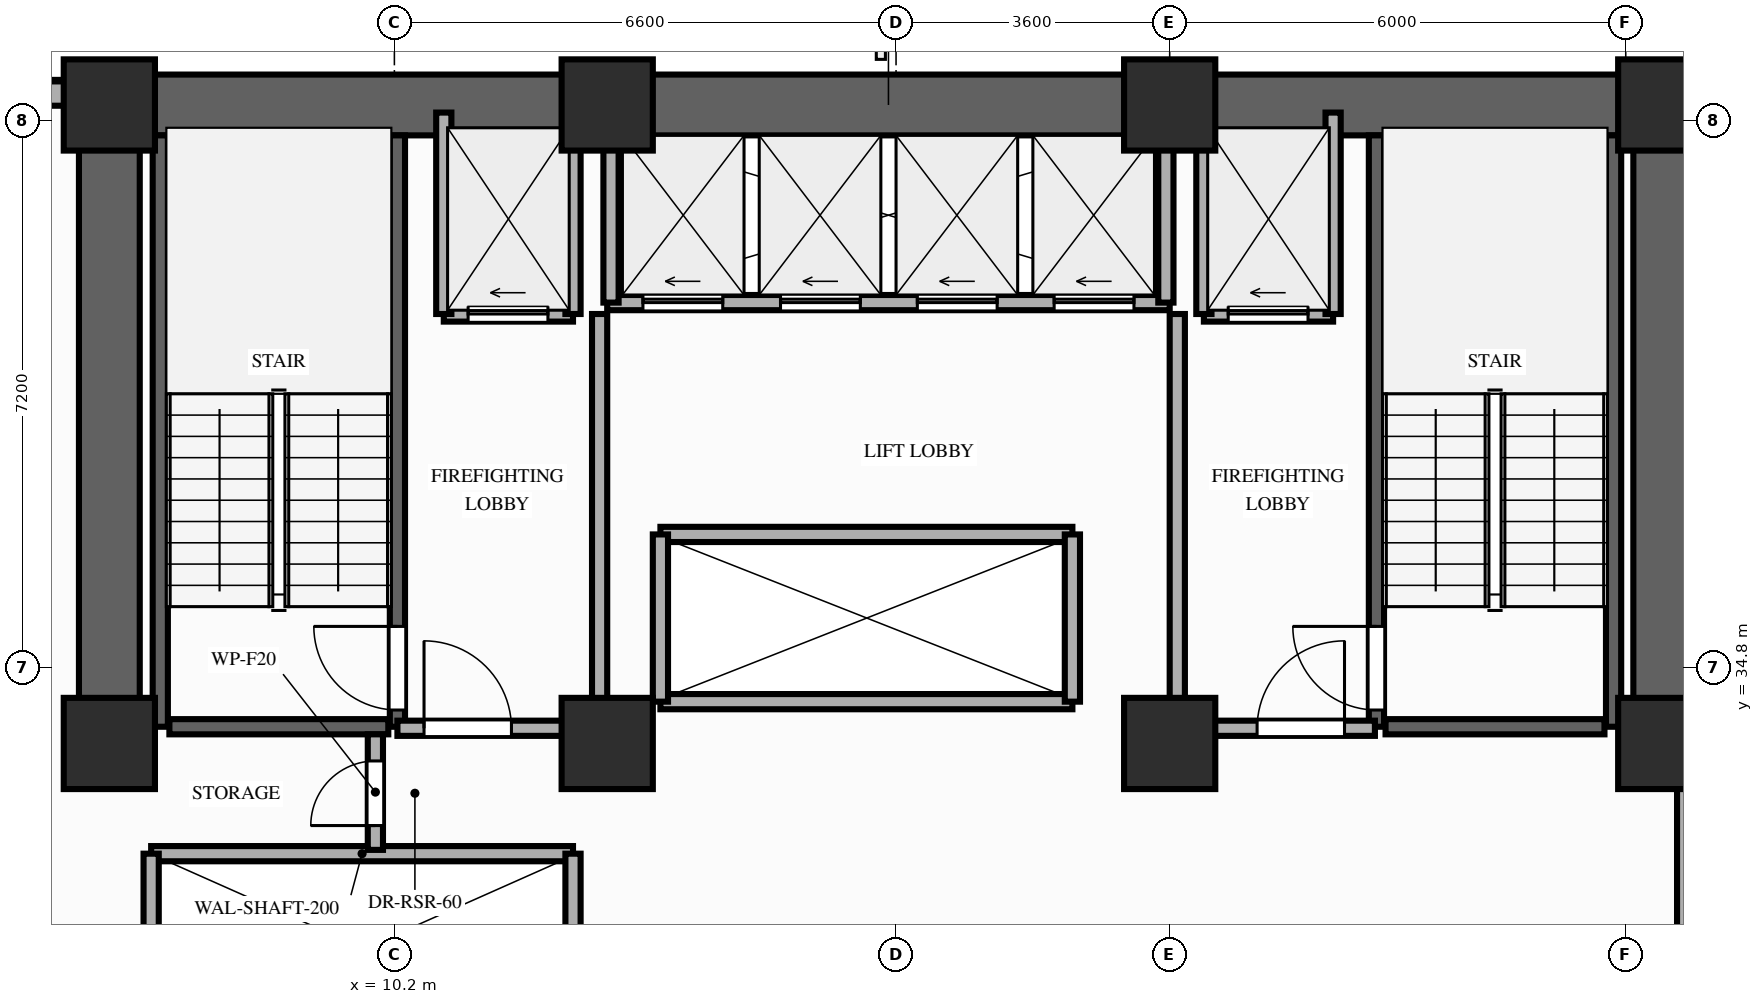
"""IFC4 building model, lengths in metres.
Left out: names, types, materials, properties, quantities, classifications, styles, units other than length and angle.
Written with IfcOpenShell. Run it as: python <this file> out.ifc"""

import sys

from ifc_helpers import new_model, si_unit, direction, frame, frame_2d, origin, origin_2d, place, context, subcontext, project, spatial, rectangle, extrude, element, fill, save


model = new_model("IFC4")
c1 = context("Model", 3, precision=1e-05, world=origin(), true_north=direction((0.0, 1.0)))
c2 = subcontext(c1, "Body", "Model", "MODEL_VIEW")
j1 = project(units=[si_unit("LENGTHUNIT", "METRE"), si_unit("PLANEANGLEUNIT", "RADIAN")], contexts=[c1])
p1 = place(None, origin())
s1 = spatial("IfcSite", under=j1, at=p1, CompositionType="ELEMENT")
p2 = place(p1, origin())
s2 = spatial("IfcBuilding", under=s1, at=p2, CompositionType="ELEMENT")
p3 = place(p2, frame((0.0, 0.0, 26.4)))
s3 = spatial("IfcBuildingStorey", under=s2, at=p3, CompositionType="ELEMENT", Elevation=26.4)
for number, where, z_axis, x_axis in (
    (1, (6.45, 33.8, 0.0), (0.0, 0.0, 1.0), (1.0, 0.0, 0.0)),
    (2, (13.0, 33.8, 0.0), (0.0, 0.0, 1.0), (1.0, 0.0, 0.0)),
    (3, (20.4, 33.8, 0.0), (0.0, 0.0, 1.0), (1.0, 0.0, 0.0)),
    (4, (26.9, 33.8, 0.0), (0.0, 0.0, 1.0), (1.0, 0.0, 0.0)),
    (5, (6.45, 42.2, 0.0), (0.0, 0.0, 1.0), (1.0, 0.0, 0.0)),
    (6, (13.0, 42.2, 0.0), (0.0, 0.0, 1.0), (1.0, 0.0, 0.0)),
    (7, (20.4, 42.2, 0.0), (0.0, 0.0, 1.0), (1.0, 0.0, 0.0)),
    (8, (26.9, 42.2, 0.0), (0.0, 0.0, 1.0), (1.0, 0.0, 0.0)),
):
    element("IfcColumn", number, at=place(p3, frame(where, z_axis=z_axis, x_axis=x_axis)), inside=s3, PredefinedType="COLUMN", context=c2, shape_type="SweptSolid", body=[
        extrude(rectangle(XDim=1.2, YDim=1.2, at=origin_2d()), origin(), (0.0, 0.0, 1.0), 3.8),
    ])
p4 = place(p3, frame((6.0, 42.35, 0.0), z_axis=(0.0, 0.0, 1.0), x_axis=(-1.0, 0.0, 0.0)))
e9 = element("IfcWall", 9, at=p4, inside=s3, PredefinedType="STANDARD", context=c2, shape_type="SweptSolid", body=[
    extrude(rectangle(XDim=2.0, YDim=0.32, at=frame_2d((1.0, 0.0))), origin(), (0.0, 0.0, 1.0), 3.62),
])
p5 = place(p3, frame((6.45, 42.2, 0.0), z_axis=(0.0, 0.0, 1.0), x_axis=(1.0, 0.0, 0.0)))
e10 = element("IfcWall", 10, at=p5, inside=s3, PredefinedType="SHEAR", context=c2, shape_type="SweptSolid", body=[
    extrude(rectangle(XDim=20.45, YDim=0.8, at=frame_2d((10.225, 0.0))), origin(), (0.0, 0.0, 1.0), 3.62),
])
for number, where, z_axis, x_axis in (
    (11, (6.45, 33.8, 0.0), (0.0, 0.0, 1.0), (0.0, 1.0, 0.0)),
    (12, (26.9, 33.8, 0.0), (0.0, 0.0, 1.0), (0.0, 1.0, 0.0)),
):
    element("IfcWall", number, at=place(p3, frame(where, z_axis=z_axis, x_axis=x_axis)), inside=s3, PredefinedType="SHEAR", context=c2, shape_type="SweptSolid", body=[
        extrude(rectangle(XDim=7.95, YDim=0.8, at=frame_2d((3.975, 0.0))), origin(), (0.0, 0.0, 1.0), 3.62),
    ])
p6 = place(p3, frame((7.12, 34.02, 0.0), z_axis=(0.0, 0.0, 1.0), x_axis=(0.0, 1.0, 0.0)))
e13 = element("IfcWall", 13, at=p6, inside=s3, PredefinedType="SHEAR", context=c2, shape_type="SweptSolid", body=[
    extrude(rectangle(XDim=7.78, YDim=0.2, at=frame_2d((3.89, 0.0))), origin(), (0.0, 0.0, 1.0), 3.62),
])
p7 = place(p3, frame((10.24, 34.02, 0.0), z_axis=(0.0, 0.0, 1.0), x_axis=(0.0, 1.0, 0.0)))
e14 = element("IfcWall", 14, at=p7, inside=s3, PredefinedType="SHEAR", context=c2, shape_type="SweptSolid", body=[
    extrude(rectangle(XDim=7.78, YDim=0.2, at=frame_2d((3.89, 0.0))), origin(), (0.0, 0.0, 1.0), 3.62),
])
p8 = place(p7, frame((0.22, 0.0, 0.0)))
e15 = element("IfcOpeningElement", 15, at=p8, cuts=e14, PredefinedType="OPENING", context=c2, shape_type="SweptSolid", body=[
    extrude(rectangle(XDim=1.1, YDim=2.15, at=frame_2d((0.55, 1.075))), frame((0.0, 0.11, 0.0), z_axis=(0.0, -1.0, 0.0), x_axis=(1.0, 0.0, 0.0)), (0.0, 0.0, 1.0), 0.22),
])
p9 = place(p3, frame((7.24, 34.02, 0.0), z_axis=(0.0, 0.0, 1.0), x_axis=(1.0, 0.0, 0.0)))
e16 = element("IfcWall", 16, at=p9, inside=s3, PredefinedType="SHEAR", context=c2, shape_type="SweptSolid", body=[
    extrude(rectangle(XDim=2.88, YDim=0.2, at=frame_2d((1.44, 0.0))), origin(), (0.0, 0.0, 1.0), 3.62),
])
p10 = place(p3, frame((23.12, 34.02, 0.0), z_axis=(0.0, 0.0, 1.0), x_axis=(0.0, 1.0, 0.0)))
e17 = element("IfcWall", 17, at=p10, inside=s3, PredefinedType="SHEAR", context=c2, shape_type="SweptSolid", body=[
    extrude(rectangle(XDim=7.78, YDim=0.2, at=frame_2d((3.89, 0.0))), origin(), (0.0, 0.0, 1.0), 3.62),
])
p11 = place(p10, frame((0.22, 0.0, 0.0)))
e18 = element("IfcOpeningElement", 18, at=p11, cuts=e17, PredefinedType="OPENING", context=c2, shape_type="SweptSolid", body=[
    extrude(rectangle(XDim=1.1, YDim=2.15, at=frame_2d((0.55, 1.075))), frame((0.0, 0.11, 0.0), z_axis=(0.0, -1.0, 0.0), x_axis=(1.0, 0.0, 0.0)), (0.0, 0.0, 1.0), 0.22),
])
p12 = place(p3, frame((26.24, 34.02, 0.0), z_axis=(0.0, 0.0, 1.0), x_axis=(0.0, 1.0, 0.0)))
e19 = element("IfcWall", 19, at=p12, inside=s3, PredefinedType="SHEAR", context=c2, shape_type="SweptSolid", body=[
    extrude(rectangle(XDim=7.78, YDim=0.2, at=frame_2d((3.89, 0.0))), origin(), (0.0, 0.0, 1.0), 3.62),
])
p13 = place(p3, frame((23.24, 34.02, 0.0), z_axis=(0.0, 0.0, 1.0), x_axis=(1.0, 0.0, 0.0)))
e20 = element("IfcWall", 20, at=p13, inside=s3, PredefinedType="SHEAR", context=c2, shape_type="SweptSolid", body=[
    extrude(rectangle(XDim=2.88, YDim=0.2, at=frame_2d((1.44, 0.0))), origin(), (0.0, 0.0, 1.0), 3.62),
])
p14 = place(p3, frame((7.0, 32.35, 0.0), z_axis=(0.0, 0.0, 1.0), x_axis=(1.0, 0.0, 0.0)))
e21 = element("IfcWall", 21, at=p14, inside=s3, PredefinedType="MOVABLE", context=c2, shape_type="SweptSolid", body=[
    extrude(rectangle(XDim=5.55, YDim=0.2, at=frame_2d((2.775, 0.0))), origin(), (0.0, 0.0, 1.0), 3.62),
])
for number, where, z_axis, x_axis in (
    (22, (7.0, 29.85, 0.0), (0.0, 0.0, 1.0), (0.0, 1.0, 0.0)),
    (23, (12.55, 29.85, 0.0), (0.0, 0.0, 1.0), (0.0, 1.0, 0.0)),
):
    element("IfcWall", number, at=place(p3, frame(where, z_axis=z_axis, x_axis=x_axis)), inside=s3, PredefinedType="MOVABLE", context=c2, shape_type="SweptSolid", body=[
        extrude(rectangle(XDim=2.5, YDim=0.2, at=frame_2d((1.25, 0.0))), origin(), (0.0, 0.0, 1.0), 3.62),
    ])
p15 = place(p3, frame((10.85, 39.45, 0.0), z_axis=(0.0, 0.0, 1.0), x_axis=(1.0, 0.0, 0.0)))
e24 = element("IfcWall", 24, at=p15, inside=s3, PredefinedType="MOVABLE", context=c2, shape_type="SweptSolid", body=[
    extrude(rectangle(XDim=1.7, YDim=0.2, at=frame_2d((0.85, 0.0))), origin(), (0.0, 0.0, 1.0), 3.62),
])
p16 = place(p15, frame((0.32, 0.0, 0.0)))
e25 = element("IfcOpeningElement", 25, at=p16, cuts=e24, PredefinedType="OPENING", context=c2, shape_type="SweptSolid", body=[
    extrude(rectangle(XDim=1.05, YDim=2.15, at=frame_2d((0.525, 1.075))), frame((0.0, 0.11, 0.0), z_axis=(0.0, -1.0, 0.0), x_axis=(1.0, 0.0, 0.0)), (0.0, 0.0, 1.0), 0.22),
])
p17 = place(p3, frame((20.85, 39.45, 0.0), z_axis=(0.0, 0.0, 1.0), x_axis=(1.0, 0.0, 0.0)))
e26 = element("IfcWall", 26, at=p17, inside=s3, PredefinedType="MOVABLE", context=c2, shape_type="SweptSolid", body=[
    extrude(rectangle(XDim=1.7, YDim=0.2, at=frame_2d((0.85, 0.0))), origin(), (0.0, 0.0, 1.0), 3.62),
])
p18 = place(p17, frame((0.32, 0.0, 0.0)))
e27 = element("IfcOpeningElement", 27, at=p18, cuts=e26, PredefinedType="OPENING", context=c2, shape_type="SweptSolid", body=[
    extrude(rectangle(XDim=1.05, YDim=2.15, at=frame_2d((0.525, 1.075))), frame((0.0, 0.11, 0.0), z_axis=(0.0, -1.0, 0.0), x_axis=(1.0, 0.0, 0.0)), (0.0, 0.0, 1.0), 0.22),
])
for number, where, z_axis, x_axis in (
    (28, (10.85, 39.45, 0.0), (0.0, 0.0, 1.0), (0.0, 1.0, 0.0)),
    (29, (12.55, 39.45, 0.0), (0.0, 0.0, 1.0), (0.0, 1.0, 0.0)),
):
    element("IfcWall", number, at=place(p3, frame(where, z_axis=z_axis, x_axis=x_axis)), inside=s3, PredefinedType="MOVABLE", context=c2, shape_type="SweptSolid", body=[
        extrude(rectangle(XDim=2.65, YDim=0.2, at=frame_2d((1.325, 0.0))), origin(), (0.0, 0.0, 1.0), 3.0),
    ])
p19 = place(p3, frame((12.9, 34.0, 0.0), z_axis=(0.0, 0.0, 1.0), x_axis=(0.0, 1.0, 0.0)))
e30 = element("IfcWall", 30, at=p19, inside=s3, PredefinedType="PARTITIONING", context=c2, shape_type="SweptSolid", body=[
    extrude(rectangle(XDim=5.45, YDim=0.2, at=frame_2d((2.725, 0.0))), origin(), (0.0, 0.0, 1.0), 3.0),
])
p20 = place(p3, frame((10.24, 34.0, 0.0), z_axis=(0.0, 0.0, 1.0), x_axis=(1.0, 0.0, 0.0)))
e31 = element("IfcWall", 31, at=p20, inside=s3, PredefinedType="PARTITIONING", context=c2, shape_type="SweptSolid", body=[
    extrude(rectangle(XDim=2.66, YDim=0.2, at=frame_2d((1.33, 0.0))), origin(), (0.0, 0.0, 1.0), 3.0),
])
p21 = place(p20, frame((0.35, 0.0, 0.0)))
e32 = element("IfcOpeningElement", 32, at=p21, cuts=e31, PredefinedType="OPENING", context=c2, shape_type="SweptSolid", body=[
    extrude(rectangle(XDim=1.15, YDim=2.15, at=frame_2d((0.575, 1.075))), frame((0.0, 0.11, 0.0), z_axis=(0.0, -1.0, 0.0), x_axis=(1.0, 0.0, 0.0)), (0.0, 0.0, 1.0), 0.22),
])
for number, where, z_axis, x_axis in (
    (33, (20.85, 39.45, 0.0), (0.0, 0.0, 1.0), (0.0, 1.0, 0.0)),
    (34, (22.55, 39.45, 0.0), (0.0, 0.0, 1.0), (0.0, 1.0, 0.0)),
):
    element("IfcWall", number, at=place(p3, frame(where, z_axis=z_axis, x_axis=x_axis)), inside=s3, PredefinedType="MOVABLE", context=c2, shape_type="SweptSolid", body=[
        extrude(rectangle(XDim=2.65, YDim=0.2, at=frame_2d((1.325, 0.0))), origin(), (0.0, 0.0, 1.0), 3.0),
    ])
p22 = place(p3, frame((20.5, 34.0, 0.0), z_axis=(0.0, 0.0, 1.0), x_axis=(0.0, 1.0, 0.0)))
e35 = element("IfcWall", 35, at=p22, inside=s3, PredefinedType="PARTITIONING", context=c2, shape_type="SweptSolid", body=[
    extrude(rectangle(XDim=5.45, YDim=0.2, at=frame_2d((2.725, 0.0))), origin(), (0.0, 0.0, 1.0), 3.0),
])
p23 = place(p3, frame((20.5, 34.0, 0.0), z_axis=(0.0, 0.0, 1.0), x_axis=(1.0, 0.0, 0.0)))
e36 = element("IfcWall", 36, at=p23, inside=s3, PredefinedType="PARTITIONING", context=c2, shape_type="SweptSolid", body=[
    extrude(rectangle(XDim=2.6, YDim=0.2, at=frame_2d((1.3, 0.0))), origin(), (0.0, 0.0, 1.0), 3.0),
])
p24 = place(p23, frame((1.05, 0.0, 0.0)))
e37 = element("IfcOpeningElement", 37, at=p24, cuts=e36, PredefinedType="OPENING", context=c2, shape_type="SweptSolid", body=[
    extrude(rectangle(XDim=1.15, YDim=2.15, at=frame_2d((0.575, 1.075))), frame((0.0, 0.11, 0.0), z_axis=(0.0, -1.0, 0.0), x_axis=(1.0, 0.0, 0.0)), (0.0, 0.0, 1.0), 0.22),
])
p25 = place(p3, frame((9.95, 32.4, 0.0), z_axis=(0.0, 0.0, 1.0), x_axis=(0.0, 1.0, 0.0)))
e38 = element("IfcWall", 38, at=p25, inside=s3, PredefinedType="PARTITIONING", context=c2, shape_type="SweptSolid", body=[
    extrude(rectangle(XDim=1.52, YDim=0.2, at=frame_2d((0.76, 0.0))), origin(), (0.0, 0.0, 1.0), 3.0),
])
p26 = place(p25, frame((0.32, 0.0, 0.0)))
e39 = element("IfcOpeningElement", 39, at=p26, cuts=e38, PredefinedType="OPENING", context=c2, shape_type="SweptSolid", body=[
    extrude(rectangle(XDim=0.85, YDim=2.05, at=frame_2d((0.425, 1.025))), frame((0.0, 0.11, 0.0), z_axis=(0.0, -1.0, 0.0), x_axis=(1.0, 0.0, 0.0)), (0.0, 0.0, 1.0), 0.22),
])
p27 = place(p3, frame((13.0, 39.6, 0.0), z_axis=(0.0, 0.0, 1.0), x_axis=(1.0, 0.0, 0.0)))
e40 = element("IfcWall", 40, at=p27, inside=s3, PredefinedType="MOVABLE", context=c2, shape_type="SweptSolid", body=[
    extrude(rectangle(XDim=7.4, YDim=0.2, at=frame_2d((3.7, 0.0))), origin(), (0.0, 0.0, 1.0), 3.62),
])
p28 = place(p27, frame((0.47, 0.0, 0.0)))
e41 = element("IfcOpeningElement", 41, at=p28, cuts=e40, PredefinedType="OPENING", context=c2, shape_type="SweptSolid", body=[
    extrude(rectangle(XDim=1.05, YDim=2.15, at=frame_2d((0.525, 1.075))), frame((0.0, 0.11, 0.0), z_axis=(0.0, -1.0, 0.0), x_axis=(1.0, 0.0, 0.0)), (0.0, 0.0, 1.0), 0.22),
])
p29 = place(p27, frame((2.28, 0.0, 0.0)))
e42 = element("IfcOpeningElement", 42, at=p29, cuts=e40, PredefinedType="OPENING", context=c2, shape_type="SweptSolid", body=[
    extrude(rectangle(XDim=1.05, YDim=2.15, at=frame_2d((0.525, 1.075))), frame((0.0, 0.11, 0.0), z_axis=(0.0, -1.0, 0.0), x_axis=(1.0, 0.0, 0.0)), (0.0, 0.0, 1.0), 0.22),
])
p30 = place(p27, frame((4.08, 0.0, 0.0)))
e43 = element("IfcOpeningElement", 43, at=p30, cuts=e40, PredefinedType="OPENING", context=c2, shape_type="SweptSolid", body=[
    extrude(rectangle(XDim=1.05, YDim=2.15, at=frame_2d((0.525, 1.075))), frame((0.0, 0.11, 0.0), z_axis=(0.0, -1.0, 0.0), x_axis=(1.0, 0.0, 0.0)), (0.0, 0.0, 1.0), 0.22),
])
p31 = place(p27, frame((5.88, 0.0, 0.0)))
e44 = element("IfcOpeningElement", 44, at=p31, cuts=e40, PredefinedType="OPENING", context=c2, shape_type="SweptSolid", body=[
    extrude(rectangle(XDim=1.05, YDim=2.15, at=frame_2d((0.525, 1.075))), frame((0.0, 0.11, 0.0), z_axis=(0.0, -1.0, 0.0), x_axis=(1.0, 0.0, 0.0)), (0.0, 0.0, 1.0), 0.22),
])
for number, where, z_axis, x_axis in (
    (45, (13.05, 39.6, 0.0), (0.0, 0.0, 1.0), (0.0, 1.0, 0.0)),
    (46, (20.35, 39.6, 0.0), (0.0, 0.0, 1.0), (0.0, 1.0, 0.0)),
):
    element("IfcWall", number, at=place(p3, frame(where, z_axis=z_axis, x_axis=x_axis)), inside=s3, PredefinedType="MOVABLE", context=c2, shape_type="SweptSolid", body=[
        extrude(rectangle(XDim=2.18, YDim=0.2, at=frame_2d((1.09, 0.0))), origin(), (0.0, 0.0, 1.0), 3.62),
    ])
for number, where, z_axis, x_axis in (
    (47, (13.7, 34.35, 0.0), (0.0, 0.0, 1.0), (1.0, 0.0, 0.0)),
    (48, (13.7, 36.55, 0.0), (0.0, 0.0, 1.0), (1.0, 0.0, 0.0)),
):
    element("IfcWall", number, at=place(p3, frame(where, z_axis=z_axis, x_axis=x_axis)), inside=s3, PredefinedType="MOVABLE", context=c2, shape_type="SweptSolid", body=[
        extrude(rectangle(XDim=5.42, YDim=0.2, at=frame_2d((2.71, 0.0))), origin(), (0.0, 0.0, 1.0), 3.62),
    ])
for number, where, z_axis, x_axis in (
    (49, (13.7, 34.35, 0.0), (0.0, 0.0, 1.0), (0.0, 1.0, 0.0)),
    (50, (19.12, 34.35, 0.0), (0.0, 0.0, 1.0), (0.0, 1.0, 0.0)),
):
    element("IfcWall", number, at=place(p3, frame(where, z_axis=z_axis, x_axis=x_axis)), inside=s3, PredefinedType="MOVABLE", context=c2, shape_type="SweptSolid", body=[
        extrude(rectangle(XDim=2.2, YDim=0.2, at=frame_2d((1.1, 0.0))), origin(), (0.0, 0.0, 1.0), 3.62),
    ])
p32 = place(p3, frame((27.15, 31.2, 0.0), z_axis=(0.0, 0.0, 1.0), x_axis=(0.0, 1.0, 0.0)))
e51 = element("IfcWall", 51, at=p32, inside=s3, PredefinedType="PARTITIONING", context=c2, shape_type="SweptSolid", body=[
    extrude(rectangle(XDim=2.48, YDim=0.15, at=frame_2d((1.24, 0.0))), origin(), (0.0, 0.0, 1.0), 3.0),
])
p33 = place(p8, origin())
e52 = element("IfcDoor", 52, at=p33, inside=s3, OperationType="SINGLE_SWING_RIGHT", PredefinedType="DOOR", context=c2, shape_type="SweptSolid", body=[
    extrude(rectangle(XDim=1.1, YDim=2.15, at=frame_2d((0.55, 1.075))), frame((0.0, 0.025, 0.0), z_axis=(0.0, -1.0, 0.0), x_axis=(1.0, 0.0, 0.0)), (0.0, 0.0, 1.0), 0.05),
])
fill(e15, e52)
p34 = place(p11, origin())
e53 = element("IfcDoor", 53, at=p34, inside=s3, OperationType="SINGLE_SWING_RIGHT", PredefinedType="DOOR", context=c2, shape_type="SweptSolid", body=[
    extrude(rectangle(XDim=1.1, YDim=2.15, at=frame_2d((0.55, 1.075))), frame((0.0, 0.025, 0.0), z_axis=(0.0, -1.0, 0.0), x_axis=(1.0, 0.0, 0.0)), (0.0, 0.0, 1.0), 0.05),
])
fill(e18, e53)
p35 = place(p16, origin())
e54 = element("IfcDoor", 54, at=p35, inside=s3, OperationType="SLIDING_TO_LEFT", PredefinedType="DOOR", context=c2, shape_type="SweptSolid", body=[
    extrude(rectangle(XDim=1.05, YDim=2.15, at=frame_2d((0.525, 1.075))), frame((0.0, 0.025, 0.0), z_axis=(0.0, -1.0, 0.0), x_axis=(1.0, 0.0, 0.0)), (0.0, 0.0, 1.0), 0.05),
])
fill(e25, e54)
p36 = place(p18, origin())
e55 = element("IfcDoor", 55, at=p36, inside=s3, OperationType="SLIDING_TO_LEFT", PredefinedType="DOOR", context=c2, shape_type="SweptSolid", body=[
    extrude(rectangle(XDim=1.05, YDim=2.15, at=frame_2d((0.525, 1.075))), frame((0.0, 0.025, 0.0), z_axis=(0.0, -1.0, 0.0), x_axis=(1.0, 0.0, 0.0)), (0.0, 0.0, 1.0), 0.05),
])
fill(e27, e55)
p37 = place(p21, origin())
e56 = element("IfcDoor", 56, at=p37, inside=s3, OperationType="SINGLE_SWING_LEFT", PredefinedType="DOOR", context=c2, shape_type="SweptSolid", body=[
    extrude(rectangle(XDim=1.15, YDim=2.15, at=frame_2d((0.575, 1.075))), frame((0.0, 0.025, 0.0), z_axis=(0.0, -1.0, 0.0), x_axis=(1.0, 0.0, 0.0)), (0.0, 0.0, 1.0), 0.05),
])
fill(e32, e56)
p38 = place(p24, origin())
e57 = element("IfcDoor", 57, at=p38, inside=s3, OperationType="SINGLE_SWING_RIGHT", PredefinedType="DOOR", context=c2, shape_type="SweptSolid", body=[
    extrude(rectangle(XDim=1.15, YDim=2.15, at=frame_2d((0.575, 1.075))), frame((0.0, 0.025, 0.0), z_axis=(0.0, -1.0, 0.0), x_axis=(1.0, 0.0, 0.0)), (0.0, 0.0, 1.0), 0.05),
])
fill(e37, e57)
p39 = place(p26, origin())
e58 = element("IfcDoor", 58, at=p39, inside=s3, OperationType="SINGLE_SWING_LEFT", PredefinedType="DOOR", context=c2, shape_type="SweptSolid", body=[
    extrude(rectangle(XDim=0.85, YDim=2.05, at=frame_2d((0.425, 1.025))), frame((0.0, 0.025, 0.0), z_axis=(0.0, -1.0, 0.0), x_axis=(1.0, 0.0, 0.0)), (0.0, 0.0, 1.0), 0.05),
])
fill(e39, e58)
p40 = place(p28, origin())
e59 = element("IfcDoor", 59, at=p40, inside=s3, OperationType="SLIDING_TO_LEFT", PredefinedType="DOOR", context=c2, shape_type="SweptSolid", body=[
    extrude(rectangle(XDim=1.05, YDim=2.15, at=frame_2d((0.525, 1.075))), frame((0.0, 0.025, 0.0), z_axis=(0.0, -1.0, 0.0), x_axis=(1.0, 0.0, 0.0)), (0.0, 0.0, 1.0), 0.05),
])
fill(e41, e59)
p41 = place(p29, origin())
e60 = element("IfcDoor", 60, at=p41, inside=s3, OperationType="SLIDING_TO_LEFT", PredefinedType="DOOR", context=c2, shape_type="SweptSolid", body=[
    extrude(rectangle(XDim=1.05, YDim=2.15, at=frame_2d((0.525, 1.075))), frame((0.0, 0.025, 0.0), z_axis=(0.0, -1.0, 0.0), x_axis=(1.0, 0.0, 0.0)), (0.0, 0.0, 1.0), 0.05),
])
fill(e42, e60)
p42 = place(p30, origin())
e61 = element("IfcDoor", 61, at=p42, inside=s3, OperationType="SLIDING_TO_LEFT", PredefinedType="DOOR", context=c2, shape_type="SweptSolid", body=[
    extrude(rectangle(XDim=1.05, YDim=2.15, at=frame_2d((0.525, 1.075))), frame((0.0, 0.025, 0.0), z_axis=(0.0, -1.0, 0.0), x_axis=(1.0, 0.0, 0.0)), (0.0, 0.0, 1.0), 0.05),
])
fill(e43, e61)
p43 = place(p31, origin())
e62 = element("IfcDoor", 62, at=p43, inside=s3, OperationType="SLIDING_TO_LEFT", PredefinedType="DOOR", context=c2, shape_type="SweptSolid", body=[
    extrude(rectangle(XDim=1.05, YDim=2.15, at=frame_2d((0.525, 1.075))), frame((0.0, 0.025, 0.0), z_axis=(0.0, -1.0, 0.0), x_axis=(1.0, 0.0, 0.0)), (0.0, 0.0, 1.0), 0.05),
])
fill(e44, e62)
save(model, sys.argv[1])
